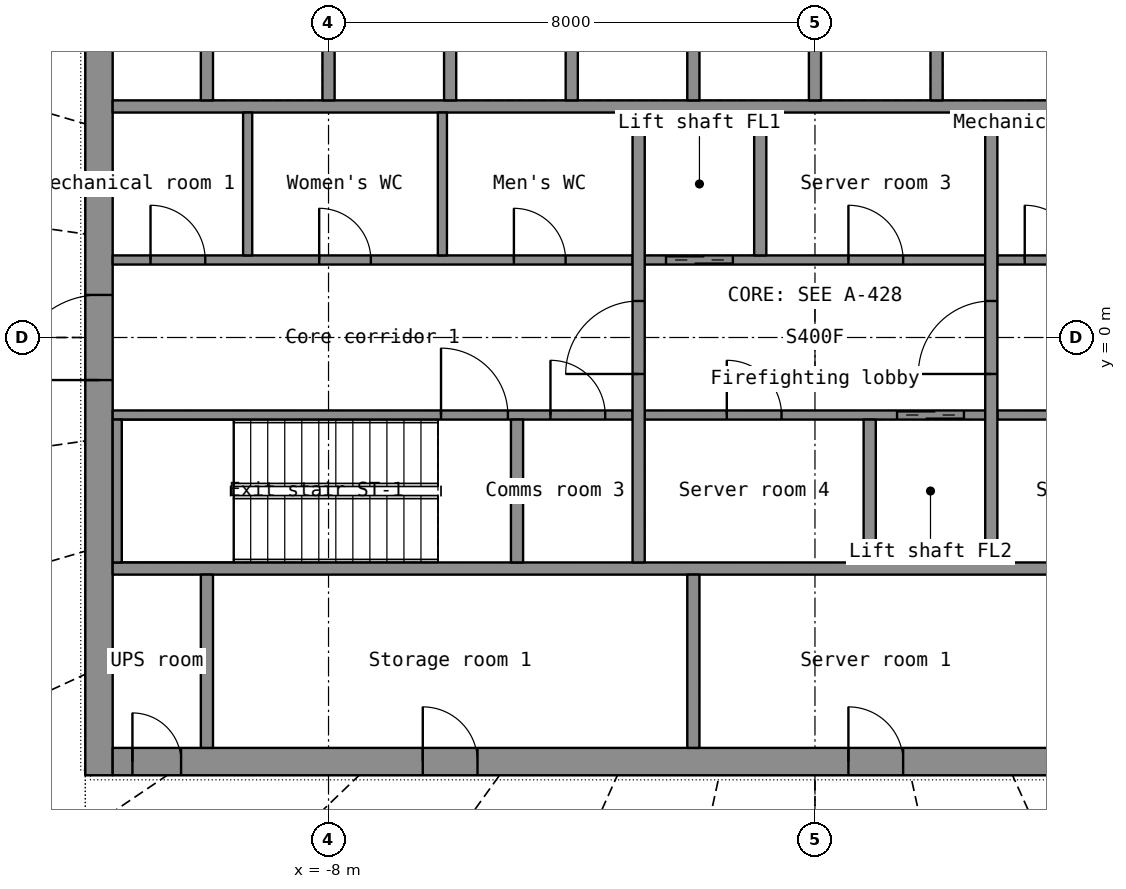
"""IFC4 building model, lengths in metres.
Left out: names, types, materials, properties, quantities, classifications, styles, units other than length and angle.
Written with IfcOpenShell. Run it as: python <this file> out.ifc"""

import sys

from ifc_helpers import new_model, si_unit, direction, frame, frame_2d, origin, place, context, subcontext, project, spatial, rectangle, extrude, element, fill, save


model = new_model("IFC4")
c1 = context("Model", 3, precision=1e-05, world=origin(), true_north=direction((0.0, 1.0)))
c2 = subcontext(c1, "Body", "Model", "MODEL_VIEW")
j1 = project(units=[si_unit("LENGTHUNIT", "METRE"), si_unit("PLANEANGLEUNIT", "RADIAN")], contexts=[c1])
p1 = place(None, origin())
s1 = spatial("IfcSite", under=j1, at=p1, CompositionType="ELEMENT")
p2 = place(p1, origin())
s2 = spatial("IfcBuilding", under=s1, at=p2, CompositionType="ELEMENT")
p3 = place(p2, frame((0.0, 0.0, 212.6)))
s3 = spatial("IfcBuildingStorey", under=s2, at=p3, CompositionType="ELEMENT", Elevation=212.6)
p4 = place(p3, frame((-11.775, -7.2, 0.0), z_axis=(0.0, 0.0, 1.0), x_axis=(0.0, 1.0, 0.0)))
e1 = element("IfcWall", 1, at=p4, inside=s3, PredefinedType="SHEAR", context=c2, shape_type="SweptSolid", body=[
    extrude(rectangle(XDim=14.4, YDim=0.45, at=frame_2d((7.2, 0.0))), origin(), (0.0, 0.0, 1.0), 4.1),
])
p5 = place(p4, frame((6.5, 0.0, 0.0)))
e2 = element("IfcOpeningElement", 2, at=p5, cuts=e1, PredefinedType="OPENING", context=c2, shape_type="SweptSolid", body=[
    extrude(rectangle(XDim=1.4, YDim=2.2, at=frame_2d((0.7, 1.1))), frame((0.0, 0.235, 0.0), z_axis=(0.0, -1.0, 0.0), x_axis=(1.0, 0.0, 0.0)), (0.0, 0.0, 1.0), 0.47),
])
p6 = place(p3, frame((-11.55, -6.975, 0.0), z_axis=(0.0, 0.0, 1.0), x_axis=(1.0, 0.0, 0.0)))
e3 = element("IfcWall", 3, at=p6, inside=s3, PredefinedType="SHEAR", context=c2, shape_type="SweptSolid", body=[
    extrude(rectangle(XDim=23.1, YDim=0.45, at=frame_2d((11.55, 0.0))), origin(), (0.0, 0.0, 1.0), 4.1),
])
p7 = place(p6, frame((20.0, 0.0, 0.0)))
e4 = element("IfcOpeningElement", 4, at=p7, cuts=e3, PredefinedType="OPENING", context=c2, shape_type="SweptSolid", body=[
    extrude(rectangle(XDim=1.1, YDim=2.2, at=frame_2d((0.55, 1.1))), frame((0.0, 0.235, 0.0), z_axis=(0.0, -1.0, 0.0), x_axis=(1.0, 0.0, 0.0)), (0.0, 0.0, 1.0), 0.47),
])
p8 = place(p6, frame((5.1, 0.0, 0.0)))
e5 = element("IfcOpeningElement", 5, at=p8, cuts=e3, PredefinedType="OPENING", context=c2, shape_type="SweptSolid", body=[
    extrude(rectangle(XDim=0.9, YDim=2.1, at=frame_2d((0.45, 1.05))), frame((0.0, 0.235, 0.0), z_axis=(0.0, -1.0, 0.0), x_axis=(1.0, 0.0, 0.0)), (0.0, 0.0, 1.0), 0.47),
])
p9 = place(p6, frame((12.1, 0.0, 0.0)))
e6 = element("IfcOpeningElement", 6, at=p9, cuts=e3, PredefinedType="OPENING", context=c2, shape_type="SweptSolid", body=[
    extrude(rectangle(XDim=0.9, YDim=2.1, at=frame_2d((0.45, 1.05))), frame((0.0, 0.235, 0.0), z_axis=(0.0, -1.0, 0.0), x_axis=(1.0, 0.0, 0.0)), (0.0, 0.0, 1.0), 0.47),
])
p10 = place(p6, frame((17.1, 0.0, 0.0)))
e7 = element("IfcOpeningElement", 7, at=p10, cuts=e3, PredefinedType="OPENING", context=c2, shape_type="SweptSolid", body=[
    extrude(rectangle(XDim=0.9, YDim=2.1, at=frame_2d((0.45, 1.05))), frame((0.0, 0.235, 0.0), z_axis=(0.0, -1.0, 0.0), x_axis=(1.0, 0.0, 0.0)), (0.0, 0.0, 1.0), 0.47),
])
p11 = place(p6, frame((0.325, 0.0, 0.0)))
e8 = element("IfcOpeningElement", 8, at=p11, cuts=e3, PredefinedType="OPENING", context=c2, shape_type="SweptSolid", body=[
    extrude(rectangle(XDim=0.8, YDim=2.05, at=frame_2d((0.4, 1.025))), frame((0.0, 0.235, 0.0), z_axis=(0.0, -1.0, 0.0), x_axis=(1.0, 0.0, 0.0)), (0.0, 0.0, 1.0), 0.47),
])
p12 = place(p6, frame((21.975, 0.0, 0.0)))
e9 = element("IfcOpeningElement", 9, at=p12, cuts=e3, PredefinedType="OPENING", context=c2, shape_type="SweptSolid", body=[
    extrude(rectangle(XDim=0.8, YDim=2.05, at=frame_2d((0.4, 1.025))), frame((0.0, 0.235, 0.0), z_axis=(0.0, -1.0, 0.0), x_axis=(1.0, 0.0, 0.0)), (0.0, 0.0, 1.0), 0.47),
])
for number, where, z_axis, x_axis in (
    (10, (-11.55, -3.8, 0.0), (0.0, 0.0, 1.0), (1.0, 0.0, 0.0)),
    (11, (-11.55, 3.8, 0.0), (0.0, 0.0, 1.0), (1.0, 0.0, 0.0)),
):
    element("IfcWall", number, at=place(p3, frame(where, z_axis=z_axis, x_axis=x_axis)), inside=s3, PredefinedType="SHEAR", context=c2, shape_type="SweptSolid", body=[
        extrude(rectangle(XDim=23.1, YDim=0.2, at=frame_2d((11.55, 0.0))), origin(), (0.0, 0.0, 1.0), 4.1),
    ])
p13 = place(p3, frame((-10.0, -6.75, 0.0), z_axis=(0.0, 0.0, 1.0), x_axis=(0.0, 1.0, 0.0)))
e12 = element("IfcWall", 12, at=p13, inside=s3, PredefinedType="SHEAR", context=c2, shape_type="SweptSolid", body=[
    extrude(rectangle(XDim=2.85, YDim=0.2, at=frame_2d((1.425, 0.0))), origin(), (0.0, 0.0, 1.0), 4.1),
])
p14 = place(p3, frame((-2.0, -6.75, 0.0), z_axis=(0.0, 0.0, 1.0), x_axis=(0.0, 1.0, 0.0)))
e13 = element("IfcWall", 13, at=p14, inside=s3, PredefinedType="PARTITIONING", context=c2, shape_type="SweptSolid", body=[
    extrude(rectangle(XDim=2.85, YDim=0.2, at=frame_2d((1.425, 0.0))), origin(), (0.0, 0.0, 1.0), 4.1),
])
for number, where, z_axis, x_axis in (
    (14, (-10.0, 3.9, 0.0), (0.0, 0.0, 1.0), (0.0, 1.0, 0.0)),
    (15, (-8.0, 3.9, 0.0), (0.0, 0.0, 1.0), (0.0, 1.0, 0.0)),
    (16, (-6.0, 3.9, 0.0), (0.0, 0.0, 1.0), (0.0, 1.0, 0.0)),
    (17, (-4.0, 3.9, 0.0), (0.0, 0.0, 1.0), (0.0, 1.0, 0.0)),
    (18, (-2.0, 3.9, 0.0), (0.0, 0.0, 1.0), (0.0, 1.0, 0.0)),
    (19, (0.0, 3.9, 0.0), (0.0, 0.0, 1.0), (0.0, 1.0, 0.0)),
    (20, (2.0, 3.9, 0.0), (0.0, 0.0, 1.0), (0.0, 1.0, 0.0)),
):
    element("IfcWall", number, at=place(p3, frame(where, z_axis=z_axis, x_axis=x_axis)), inside=s3, PredefinedType="SHEAR", context=c2, shape_type="SweptSolid", body=[
        extrude(rectangle(XDim=2.85, YDim=0.2, at=frame_2d((1.425, 0.0))), origin(), (0.0, 0.0, 1.0), 4.1),
    ])
p15 = place(p3, frame((-11.55, -1.275, 0.0), z_axis=(0.0, 0.0, 1.0), x_axis=(1.0, 0.0, 0.0)))
e21 = element("IfcWall", 21, at=p15, inside=s3, PredefinedType="SHEAR", context=c2, shape_type="SweptSolid", body=[
    extrude(rectangle(XDim=8.55, YDim=0.15, at=frame_2d((4.275, 0.0))), origin(), (0.0, 0.0, 1.0), 4.1),
])
p16 = place(p15, frame((5.4, 0.0, 0.0)))
e22 = element("IfcOpeningElement", 22, at=p16, cuts=e21, PredefinedType="OPENING", context=c2, shape_type="SweptSolid", body=[
    extrude(rectangle(XDim=1.1, YDim=2.15, at=frame_2d((0.55, 1.075))), frame((0.0, 0.085, 0.0), z_axis=(0.0, -1.0, 0.0), x_axis=(1.0, 0.0, 0.0)), (0.0, 0.0, 1.0), 0.17),
])
p17 = place(p15, frame((7.2, 0.0, 0.0)))
e23 = element("IfcOpeningElement", 23, at=p17, cuts=e21, PredefinedType="OPENING", context=c2, shape_type="SweptSolid", body=[
    extrude(rectangle(XDim=0.9, YDim=2.1, at=frame_2d((0.45, 1.05))), frame((0.0, 0.085, 0.0), z_axis=(0.0, -1.0, 0.0), x_axis=(1.0, 0.0, 0.0)), (0.0, 0.0, 1.0), 0.17),
])
p18 = place(p3, frame((-2.8, -1.275, 0.0), z_axis=(0.0, 0.0, 1.0), x_axis=(1.0, 0.0, 0.0)))
e24 = element("IfcWall", 24, at=p18, inside=s3, PredefinedType="SHEAR", context=c2, shape_type="SweptSolid", body=[
    extrude(rectangle(XDim=5.6, YDim=0.15, at=frame_2d((2.8, 0.0))), origin(), (0.0, 0.0, 1.0), 4.1),
])
p19 = place(p18, frame((4.15, 0.0, 0.0)))
e25 = element("IfcOpeningElement", 25, at=p19, cuts=e24, PredefinedType="OPENING", context=c2, shape_type="SweptSolid", body=[
    extrude(rectangle(XDim=1.1, YDim=2.2, at=frame_2d((0.55, 1.1))), frame((0.0, 0.085, 0.0), z_axis=(0.0, -1.0, 0.0), x_axis=(1.0, 0.0, 0.0)), (0.0, 0.0, 1.0), 0.17),
])
p20 = place(p18, frame((1.35, 0.0, 0.0)))
e26 = element("IfcOpeningElement", 26, at=p20, cuts=e24, PredefinedType="OPENING", context=c2, shape_type="SweptSolid", body=[
    extrude(rectangle(XDim=0.9, YDim=2.1, at=frame_2d((0.45, 1.05))), frame((0.0, 0.085, 0.0), z_axis=(0.0, -1.0, 0.0), x_axis=(1.0, 0.0, 0.0)), (0.0, 0.0, 1.0), 0.17),
])
p21 = place(p3, frame((3.0, -1.275, 0.0), z_axis=(0.0, 0.0, 1.0), x_axis=(1.0, 0.0, 0.0)))
e27 = element("IfcWall", 27, at=p21, inside=s3, PredefinedType="PARTITIONING", context=c2, shape_type="SweptSolid", body=[
    extrude(rectangle(XDim=8.55, YDim=0.15, at=frame_2d((4.275, 0.0))), origin(), (0.0, 0.0, 1.0), 4.1),
])
p22 = place(p21, frame((0.978, 0.0, 0.0)))
e28 = element("IfcOpeningElement", 28, at=p22, cuts=e27, PredefinedType="OPENING", context=c2, shape_type="SweptSolid", body=[
    extrude(rectangle(XDim=0.85, YDim=2.1, at=frame_2d((0.425, 1.05))), frame((0.0, 0.085, 0.0), z_axis=(0.0, -1.0, 0.0), x_axis=(1.0, 0.0, 0.0)), (0.0, 0.0, 1.0), 0.17),
])
p23 = place(p21, frame((3.685, 0.0, 0.0)))
e29 = element("IfcOpeningElement", 29, at=p23, cuts=e27, PredefinedType="OPENING", context=c2, shape_type="SweptSolid", body=[
    extrude(rectangle(XDim=0.85, YDim=2.1, at=frame_2d((0.425, 1.05))), frame((0.0, 0.085, 0.0), z_axis=(0.0, -1.0, 0.0), x_axis=(1.0, 0.0, 0.0)), (0.0, 0.0, 1.0), 0.17),
])
p24 = place(p21, frame((6.532, 0.0, 0.0)))
e30 = element("IfcOpeningElement", 30, at=p24, cuts=e27, PredefinedType="OPENING", context=c2, shape_type="SweptSolid", body=[
    extrude(rectangle(XDim=0.9, YDim=2.1, at=frame_2d((0.45, 1.05))), frame((0.0, 0.085, 0.0), z_axis=(0.0, -1.0, 0.0), x_axis=(1.0, 0.0, 0.0)), (0.0, 0.0, 1.0), 0.17),
])
p25 = place(p3, frame((-11.55, 1.275, 0.0), z_axis=(0.0, 0.0, 1.0), x_axis=(1.0, 0.0, 0.0)))
e31 = element("IfcWall", 31, at=p25, inside=s3, PredefinedType="PARTITIONING", context=c2, shape_type="SweptSolid", body=[
    extrude(rectangle(XDim=8.55, YDim=0.15, at=frame_2d((4.275, 0.0))), origin(), (0.0, 0.0, 1.0), 4.1),
])
p26 = place(p25, frame((0.623, 0.0, 0.0)))
e32 = element("IfcOpeningElement", 32, at=p26, cuts=e31, PredefinedType="OPENING", context=c2, shape_type="SweptSolid", body=[
    extrude(rectangle(XDim=0.9, YDim=2.1, at=frame_2d((0.45, 1.05))), frame((0.0, 0.085, 0.0), z_axis=(0.0, -1.0, 0.0), x_axis=(1.0, 0.0, 0.0)), (0.0, 0.0, 1.0), 0.17),
])
p27 = place(p25, frame((3.396, 0.0, 0.0)))
e33 = element("IfcOpeningElement", 33, at=p27, cuts=e31, PredefinedType="OPENING", context=c2, shape_type="SweptSolid", body=[
    extrude(rectangle(XDim=0.85, YDim=2.1, at=frame_2d((0.425, 1.05))), frame((0.0, 0.085, 0.0), z_axis=(0.0, -1.0, 0.0), x_axis=(1.0, 0.0, 0.0)), (0.0, 0.0, 1.0), 0.17),
])
p28 = place(p25, frame((6.599, 0.0, 0.0)))
e34 = element("IfcOpeningElement", 34, at=p28, cuts=e31, PredefinedType="OPENING", context=c2, shape_type="SweptSolid", body=[
    extrude(rectangle(XDim=0.85, YDim=2.1, at=frame_2d((0.425, 1.05))), frame((0.0, 0.085, 0.0), z_axis=(0.0, -1.0, 0.0), x_axis=(1.0, 0.0, 0.0)), (0.0, 0.0, 1.0), 0.17),
])
p29 = place(p3, frame((-2.8, 1.275, 0.0), z_axis=(0.0, 0.0, 1.0), x_axis=(1.0, 0.0, 0.0)))
e35 = element("IfcWall", 35, at=p29, inside=s3, PredefinedType="SHEAR", context=c2, shape_type="SweptSolid", body=[
    extrude(rectangle(XDim=5.6, YDim=0.15, at=frame_2d((2.8, 0.0))), origin(), (0.0, 0.0, 1.0), 4.1),
])
p30 = place(p29, frame((0.35, 0.0, 0.0)))
e36 = element("IfcOpeningElement", 36, at=p30, cuts=e35, PredefinedType="OPENING", context=c2, shape_type="SweptSolid", body=[
    extrude(rectangle(XDim=1.1, YDim=2.2, at=frame_2d((0.55, 1.1))), frame((0.0, 0.085, 0.0), z_axis=(0.0, -1.0, 0.0), x_axis=(1.0, 0.0, 0.0)), (0.0, 0.0, 1.0), 0.17),
])
p31 = place(p29, frame((3.35, 0.0, 0.0)))
e37 = element("IfcOpeningElement", 37, at=p31, cuts=e35, PredefinedType="OPENING", context=c2, shape_type="SweptSolid", body=[
    extrude(rectangle(XDim=0.9, YDim=2.1, at=frame_2d((0.45, 1.05))), frame((0.0, 0.085, 0.0), z_axis=(0.0, -1.0, 0.0), x_axis=(1.0, 0.0, 0.0)), (0.0, 0.0, 1.0), 0.17),
])
p32 = place(p3, frame((3.0, 1.275, 0.0), z_axis=(0.0, 0.0, 1.0), x_axis=(1.0, 0.0, 0.0)))
e38 = element("IfcWall", 38, at=p32, inside=s3, PredefinedType="SHEAR", context=c2, shape_type="SweptSolid", body=[
    extrude(rectangle(XDim=8.55, YDim=0.15, at=frame_2d((4.275, 0.0))), origin(), (0.0, 0.0, 1.0), 4.1),
])
p33 = place(p32, frame((2.05, 0.0, 0.0)))
e39 = element("IfcOpeningElement", 39, at=p33, cuts=e38, PredefinedType="OPENING", context=c2, shape_type="SweptSolid", body=[
    extrude(rectangle(XDim=1.1, YDim=2.15, at=frame_2d((0.55, 1.075))), frame((0.0, 0.085, 0.0), z_axis=(0.0, -1.0, 0.0), x_axis=(1.0, 0.0, 0.0)), (0.0, 0.0, 1.0), 0.17),
])
p34 = place(p32, frame((0.45, 0.0, 0.0)))
e40 = element("IfcOpeningElement", 40, at=p34, cuts=e38, PredefinedType="OPENING", context=c2, shape_type="SweptSolid", body=[
    extrude(rectangle(XDim=0.9, YDim=2.1, at=frame_2d((0.45, 1.05))), frame((0.0, 0.085, 0.0), z_axis=(0.0, -1.0, 0.0), x_axis=(1.0, 0.0, 0.0)), (0.0, 0.0, 1.0), 0.17),
])
p35 = place(p3, frame((-2.9, -3.7, 0.0), z_axis=(0.0, 0.0, 1.0), x_axis=(0.0, 1.0, 0.0)))
e41 = element("IfcWall", 41, at=p35, inside=s3, PredefinedType="SHEAR", context=c2, shape_type="SweptSolid", body=[
    extrude(rectangle(XDim=7.4, YDim=0.2, at=frame_2d((3.7, 0.0))), origin(), (0.0, 0.0, 1.0), 4.1),
])
p36 = place(p35, frame((3.1, 0.0, 0.0)))
e42 = element("IfcOpeningElement", 42, at=p36, cuts=e41, PredefinedType="OPENING", context=c2, shape_type="SweptSolid", body=[
    extrude(rectangle(XDim=1.2, YDim=2.2, at=frame_2d((0.6, 1.1))), frame((0.0, 0.11, 0.0), z_axis=(0.0, -1.0, 0.0), x_axis=(1.0, 0.0, 0.0)), (0.0, 0.0, 1.0), 0.22),
])
p37 = place(p3, frame((2.9, -3.7, 0.0), z_axis=(0.0, 0.0, 1.0), x_axis=(0.0, 1.0, 0.0)))
e43 = element("IfcWall", 43, at=p37, inside=s3, PredefinedType="SHEAR", context=c2, shape_type="SweptSolid", body=[
    extrude(rectangle(XDim=7.4, YDim=0.2, at=frame_2d((3.7, 0.0))), origin(), (0.0, 0.0, 1.0), 4.1),
])
p38 = place(p37, frame((3.1, 0.0, 0.0)))
e44 = element("IfcOpeningElement", 44, at=p38, cuts=e43, PredefinedType="OPENING", context=c2, shape_type="SweptSolid", body=[
    extrude(rectangle(XDim=1.2, YDim=2.2, at=frame_2d((0.6, 1.1))), frame((0.0, 0.11, 0.0), z_axis=(0.0, -1.0, 0.0), x_axis=(1.0, 0.0, 0.0)), (0.0, 0.0, 1.0), 0.22),
])
for number, where, z_axis, x_axis in (
    (45, (-0.9, 1.35, 0.0), (0.0, 0.0, 1.0), (0.0, 1.0, 0.0)),
    (46, (0.9, -3.7, 0.0), (0.0, 0.0, 1.0), (0.0, 1.0, 0.0)),
):
    element("IfcWall", number, at=place(p3, frame(where, z_axis=z_axis, x_axis=x_axis)), inside=s3, PredefinedType="SHEAR", context=c2, shape_type="SweptSolid", body=[
        extrude(rectangle(XDim=2.35, YDim=0.2, at=frame_2d((1.175, 0.0))), origin(), (0.0, 0.0, 1.0), 4.1),
    ])
p39 = place(p3, frame((-11.475, -3.7, 0.0), z_axis=(0.0, 0.0, 1.0), x_axis=(0.0, 1.0, 0.0)))
e47 = element("IfcWall", 47, at=p39, inside=s3, PredefinedType="SHEAR", context=c2, shape_type="SweptSolid", body=[
    extrude(rectangle(XDim=2.35, YDim=0.15, at=frame_2d((1.175, 0.0))), origin(), (0.0, 0.0, 1.0), 4.1),
])
p40 = place(p3, frame((-4.9, -3.7, 0.0), z_axis=(0.0, 0.0, 1.0), x_axis=(0.0, 1.0, 0.0)))
e48 = element("IfcWall", 48, at=p40, inside=s3, PredefinedType="SHEAR", context=c2, shape_type="SweptSolid", body=[
    extrude(rectangle(XDim=2.35, YDim=0.2, at=frame_2d((1.175, 0.0))), origin(), (0.0, 0.0, 1.0), 4.1),
])
for number, where, z_axis, x_axis in (
    (49, (-9.33, 1.35, 0.0), (0.0, 0.0, 1.0), (0.0, 1.0, 0.0)),
    (50, (-6.127, 1.35, 0.0), (0.0, 0.0, 1.0), (0.0, 1.0, 0.0)),
):
    element("IfcWall", number, at=place(p3, frame(where, z_axis=z_axis, x_axis=x_axis)), inside=s3, PredefinedType="PARTITIONING", context=c2, shape_type="SweptSolid", body=[
        extrude(rectangle(XDim=2.35, YDim=0.15, at=frame_2d((1.175, 0.0))), origin(), (0.0, 0.0, 1.0), 4.1),
    ])
p41 = place(p8, origin())
e51 = element("IfcDoor", 51, at=p41, inside=s3, OperationType="SINGLE_SWING_LEFT", PredefinedType="DOOR", context=c2, shape_type="SweptSolid", body=[
    extrude(rectangle(XDim=0.9, YDim=2.1, at=frame_2d((0.45, 1.05))), frame((0.0, 0.025, 0.0), z_axis=(0.0, -1.0, 0.0), x_axis=(1.0, 0.0, 0.0)), (0.0, 0.0, 1.0), 0.05),
])
fill(e5, e51)
p42 = place(p9, origin())
e52 = element("IfcDoor", 52, at=p42, inside=s3, OperationType="SINGLE_SWING_LEFT", PredefinedType="DOOR", context=c2, shape_type="SweptSolid", body=[
    extrude(rectangle(XDim=0.9, YDim=2.1, at=frame_2d((0.45, 1.05))), frame((0.0, 0.025, 0.0), z_axis=(0.0, -1.0, 0.0), x_axis=(1.0, 0.0, 0.0)), (0.0, 0.0, 1.0), 0.05),
])
fill(e6, e52)
p43 = place(p11, origin())
e53 = element("IfcDoor", 53, at=p43, inside=s3, OperationType="SINGLE_SWING_LEFT", PredefinedType="DOOR", context=c2, shape_type="SweptSolid", body=[
    extrude(rectangle(XDim=0.8, YDim=2.05, at=frame_2d((0.4, 1.025))), frame((0.0, 0.025, 0.0), z_axis=(0.0, -1.0, 0.0), x_axis=(1.0, 0.0, 0.0)), (0.0, 0.0, 1.0), 0.05),
])
fill(e8, e53)
p44 = place(p5, origin())
e54 = element("IfcDoor", 54, at=p44, inside=s3, OperationType="DOUBLE_DOOR_SINGLE_SWING", PredefinedType="DOOR", context=c2, shape_type="SweptSolid", body=[
    extrude(rectangle(XDim=1.4, YDim=2.2, at=frame_2d((0.7, 1.1))), frame((0.0, 0.025, 0.0), z_axis=(0.0, -1.0, 0.0), x_axis=(1.0, 0.0, 0.0)), (0.0, 0.0, 1.0), 0.05),
])
fill(e2, e54)
p45 = place(p36, origin())
e55 = element("IfcDoor", 55, at=p45, inside=s3, OperationType="SINGLE_SWING_LEFT", PredefinedType="DOOR", context=c2, shape_type="SweptSolid", body=[
    extrude(rectangle(XDim=1.2, YDim=2.2, at=frame_2d((0.6, 1.1))), frame((0.0, 0.025, 0.0), z_axis=(0.0, -1.0, 0.0), x_axis=(1.0, 0.0, 0.0)), (0.0, 0.0, 1.0), 0.05),
])
fill(e42, e55)
p46 = place(p38, origin())
e56 = element("IfcDoor", 56, at=p46, inside=s3, OperationType="SINGLE_SWING_LEFT", PredefinedType="DOOR", context=c2, shape_type="SweptSolid", body=[
    extrude(rectangle(XDim=1.2, YDim=2.2, at=frame_2d((0.6, 1.1))), frame((0.0, 0.025, 0.0), z_axis=(0.0, -1.0, 0.0), x_axis=(1.0, 0.0, 0.0)), (0.0, 0.0, 1.0), 0.05),
])
fill(e44, e56)
p47 = place(p30, origin())
e57 = element("IfcDoor", 57, at=p47, inside=s3, OperationType="DOUBLE_DOOR_SLIDING", PredefinedType="DOOR", context=c2, shape_type="SweptSolid", body=[
    extrude(rectangle(XDim=1.1, YDim=2.2, at=frame_2d((0.55, 1.1))), frame((0.0, 0.025, 0.0), z_axis=(0.0, -1.0, 0.0), x_axis=(1.0, 0.0, 0.0)), (0.0, 0.0, 1.0), 0.05),
])
fill(e36, e57)
p48 = place(p19, origin())
e58 = element("IfcDoor", 58, at=p48, inside=s3, OperationType="DOUBLE_DOOR_SLIDING", PredefinedType="DOOR", context=c2, shape_type="SweptSolid", body=[
    extrude(rectangle(XDim=1.1, YDim=2.2, at=frame_2d((0.55, 1.1))), frame((0.0, 0.025, 0.0), z_axis=(0.0, -1.0, 0.0), x_axis=(1.0, 0.0, 0.0)), (0.0, 0.0, 1.0), 0.05),
])
fill(e25, e58)
p49 = place(p16, origin())
e59 = element("IfcDoor", 59, at=p49, inside=s3, OperationType="SINGLE_SWING_LEFT", PredefinedType="DOOR", context=c2, shape_type="SweptSolid", body=[
    extrude(rectangle(XDim=1.1, YDim=2.15, at=frame_2d((0.55, 1.075))), frame((0.0, 0.025, 0.0), z_axis=(0.0, -1.0, 0.0), x_axis=(1.0, 0.0, 0.0)), (0.0, 0.0, 1.0), 0.05),
])
fill(e22, e59)
p50 = place(p26, origin())
e60 = element("IfcDoor", 60, at=p50, inside=s3, OperationType="SINGLE_SWING_LEFT", PredefinedType="DOOR", context=c2, shape_type="SweptSolid", body=[
    extrude(rectangle(XDim=0.9, YDim=2.1, at=frame_2d((0.45, 1.05))), frame((0.0, 0.025, 0.0), z_axis=(0.0, -1.0, 0.0), x_axis=(1.0, 0.0, 0.0)), (0.0, 0.0, 1.0), 0.05),
])
fill(e32, e60)
p51 = place(p27, origin())
e61 = element("IfcDoor", 61, at=p51, inside=s3, OperationType="SINGLE_SWING_LEFT", PredefinedType="DOOR", context=c2, shape_type="SweptSolid", body=[
    extrude(rectangle(XDim=0.85, YDim=2.1, at=frame_2d((0.425, 1.05))), frame((0.0, 0.025, 0.0), z_axis=(0.0, -1.0, 0.0), x_axis=(1.0, 0.0, 0.0)), (0.0, 0.0, 1.0), 0.05),
])
fill(e33, e61)
p52 = place(p28, origin())
e62 = element("IfcDoor", 62, at=p52, inside=s3, OperationType="SINGLE_SWING_LEFT", PredefinedType="DOOR", context=c2, shape_type="SweptSolid", body=[
    extrude(rectangle(XDim=0.85, YDim=2.1, at=frame_2d((0.425, 1.05))), frame((0.0, 0.025, 0.0), z_axis=(0.0, -1.0, 0.0), x_axis=(1.0, 0.0, 0.0)), (0.0, 0.0, 1.0), 0.05),
])
fill(e34, e62)
p53 = place(p31, origin())
e63 = element("IfcDoor", 63, at=p53, inside=s3, OperationType="SINGLE_SWING_LEFT", PredefinedType="DOOR", context=c2, shape_type="SweptSolid", body=[
    extrude(rectangle(XDim=0.9, YDim=2.1, at=frame_2d((0.45, 1.05))), frame((0.0, 0.025, 0.0), z_axis=(0.0, -1.0, 0.0), x_axis=(1.0, 0.0, 0.0)), (0.0, 0.0, 1.0), 0.05),
])
fill(e37, e63)
p54 = place(p20, origin())
e64 = element("IfcDoor", 64, at=p54, inside=s3, OperationType="SINGLE_SWING_LEFT", PredefinedType="DOOR", context=c2, shape_type="SweptSolid", body=[
    extrude(rectangle(XDim=0.9, YDim=2.1, at=frame_2d((0.45, 1.05))), frame((0.0, 0.025, 0.0), z_axis=(0.0, -1.0, 0.0), x_axis=(1.0, 0.0, 0.0)), (0.0, 0.0, 1.0), 0.05),
])
fill(e26, e64)
p55 = place(p34, origin())
e65 = element("IfcDoor", 65, at=p55, inside=s3, OperationType="SINGLE_SWING_LEFT", PredefinedType="DOOR", context=c2, shape_type="SweptSolid", body=[
    extrude(rectangle(XDim=0.9, YDim=2.1, at=frame_2d((0.45, 1.05))), frame((0.0, 0.025, 0.0), z_axis=(0.0, -1.0, 0.0), x_axis=(1.0, 0.0, 0.0)), (0.0, 0.0, 1.0), 0.05),
])
fill(e40, e65)
p56 = place(p17, origin())
e66 = element("IfcDoor", 66, at=p56, inside=s3, OperationType="SINGLE_SWING_LEFT", PredefinedType="DOOR", context=c2, shape_type="SweptSolid", body=[
    extrude(rectangle(XDim=0.9, YDim=2.1, at=frame_2d((0.45, 1.05))), frame((0.0, 0.025, 0.0), z_axis=(0.0, -1.0, 0.0), x_axis=(1.0, 0.0, 0.0)), (0.0, 0.0, 1.0), 0.05),
])
fill(e23, e66)
save(model, sys.argv[1])
